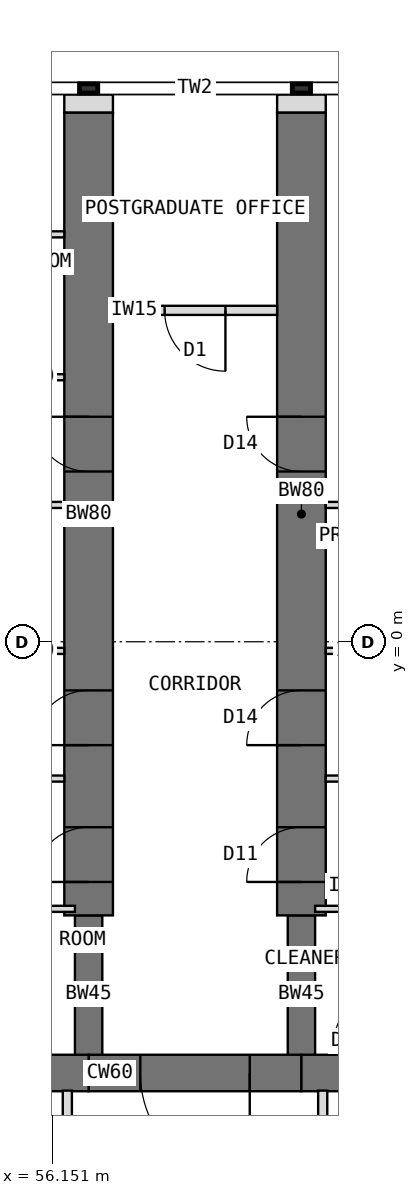
"""IFC4 building model, lengths in metres.
Left out: names, types, materials, properties, quantities, classifications, styles, units other than length and angle.
Written with IfcOpenShell. Run it as: python <this file> out.ifc"""

import sys

from ifc_helpers import new_model, si_unit, direction, frame, frame_2d, origin, place, context, subcontext, project, spatial, rectangle, extrude, element, fill, save


model = new_model("IFC4")
c1 = context("Model", 3, precision=1e-05, world=origin(), true_north=direction((0.0, 1.0)))
c2 = subcontext(c1, "Body", "Model", "MODEL_VIEW")
j1 = project(units=[si_unit("LENGTHUNIT", "METRE"), si_unit("PLANEANGLEUNIT", "RADIAN")], contexts=[c1])
p1 = place(None, origin())
s1 = spatial("IfcSite", under=j1, at=p1, CompositionType="ELEMENT")
p2 = place(p1, origin())
s2 = spatial("IfcBuilding", under=s1, at=p2, CompositionType="ELEMENT")
p3 = place(p2, frame((0.0, 0.0, 161.5)))
s3 = spatial("IfcBuildingStorey", under=s2, at=p3, CompositionType="ELEMENT", Elevation=161.5)
p4 = place(p3, frame((64.798, -7.092, 0.0), z_axis=(0.0, 0.0, 1.0), x_axis=(-1.0, 0.0, 0.0)))
e1 = element("IfcWall", 1, at=p4, inside=s3, PredefinedType="SHEAR", context=c2, shape_type="SweptSolid", body=[
    extrude(rectangle(XDim=4.548, YDim=0.6, at=frame_2d((2.274, 0.0))), origin(), (0.0, 0.0, 1.0), 4.0),
])
p5 = place(p3, frame((60.25, -7.092, 0.0), z_axis=(0.0, 0.0, 1.0), x_axis=(-1.0, 0.0, 0.0)))
e2 = element("IfcWall", 2, at=p5, inside=s3, PredefinedType="SHEAR", context=c2, shape_type="SweptSolid", body=[
    extrude(rectangle(XDim=3.5, YDim=0.6, at=frame_2d((1.75, 0.0))), origin(), (0.0, 0.0, 1.0), 4.0),
])
p6 = place(p5, frame((0.85, 0.0, 0.0)))
e3 = element("IfcOpeningElement", 3, at=p6, cuts=e2, PredefinedType="OPENING", context=c2, shape_type="SweptSolid", body=[
    extrude(rectangle(XDim=1.8, YDim=2.1, at=frame_2d((0.9, 1.05))), frame((0.0, 0.31, 0.0), z_axis=(0.0, -1.0, 0.0), x_axis=(1.0, 0.0, 0.0)), (0.0, 0.0, 1.0), 0.62),
])
p7 = place(p3, frame((56.75, -7.092, 0.0), z_axis=(0.0, 0.0, 1.0), x_axis=(-1.0, 0.0, 0.0)))
e4 = element("IfcWall", 4, at=p7, inside=s3, PredefinedType="SHEAR", context=c2, shape_type="SweptSolid", body=[
    extrude(rectangle(XDim=4.548, YDim=0.6, at=frame_2d((2.274, 0.0))), origin(), (0.0, 0.0, 1.0), 4.0),
])
p8 = place(p3, frame((56.75, -7.092, 0.0), z_axis=(0.0, 0.0, 1.0), x_axis=(0.0, 1.0, 0.0)))
e5 = element("IfcWall", 5, at=p8, inside=s3, PredefinedType="SHEAR", context=c2, shape_type="SweptSolid", body=[
    extrude(rectangle(XDim=2.592, YDim=0.45, at=frame_2d((1.296, 0.0))), origin(), (0.0, 0.0, 1.0), 4.0),
])
p9 = place(p3, frame((56.75, -4.5, 0.0), z_axis=(0.0, 0.0, 1.0), x_axis=(0.0, 1.0, 0.0)))
e6 = element("IfcWall", 6, at=p9, inside=s3, PredefinedType="SHEAR", context=c2, shape_type="SweptSolid", body=[
    extrude(rectangle(XDim=13.2, YDim=0.8, at=frame_2d((6.6, 0.0))), origin(), (0.0, 0.0, 1.0), 4.0),
])
p10 = place(p9, frame((0.55, 0.0, 0.0)))
e7 = element("IfcOpeningElement", 7, at=p10, cuts=e6, PredefinedType="OPENING", context=c2, shape_type="SweptSolid", body=[
    extrude(rectangle(XDim=0.9, YDim=2.1, at=frame_2d((0.45, 1.05))), frame((0.0, 0.41, 0.0), z_axis=(0.0, -1.0, 0.0), x_axis=(1.0, 0.0, 0.0)), (0.0, 0.0, 1.0), 0.82),
])
p11 = place(p9, frame((2.8, 0.0, 0.0)))
e8 = element("IfcOpeningElement", 8, at=p11, cuts=e6, PredefinedType="OPENING", context=c2, shape_type="SweptSolid", body=[
    extrude(rectangle(XDim=0.9, YDim=2.1, at=frame_2d((0.45, 1.05))), frame((0.0, 0.41, 0.0), z_axis=(0.0, -1.0, 0.0), x_axis=(1.0, 0.0, 0.0)), (0.0, 0.0, 1.0), 0.82),
])
p12 = place(p9, frame((7.3, 0.0, 0.0)))
e9 = element("IfcOpeningElement", 9, at=p12, cuts=e6, PredefinedType="OPENING", context=c2, shape_type="SweptSolid", body=[
    extrude(rectangle(XDim=0.9, YDim=2.1, at=frame_2d((0.45, 1.05))), frame((0.0, 0.41, 0.0), z_axis=(0.0, -1.0, 0.0), x_axis=(1.0, 0.0, 0.0)), (0.0, 0.0, 1.0), 0.82),
])
p13 = place(p3, frame((60.25, -7.092, 0.0), z_axis=(0.0, 0.0, 1.0), x_axis=(0.0, 1.0, 0.0)))
e10 = element("IfcWall", 10, at=p13, inside=s3, PredefinedType="SHEAR", context=c2, shape_type="SweptSolid", body=[
    extrude(rectangle(XDim=2.592, YDim=0.45, at=frame_2d((1.296, 0.0))), origin(), (0.0, 0.0, 1.0), 4.0),
])
p14 = place(p3, frame((60.25, -4.5, 0.0), z_axis=(0.0, 0.0, 1.0), x_axis=(0.0, 1.0, 0.0)))
e11 = element("IfcWall", 11, at=p14, inside=s3, PredefinedType="SHEAR", context=c2, shape_type="SweptSolid", body=[
    extrude(rectangle(XDim=13.2, YDim=0.8, at=frame_2d((6.6, 0.0))), origin(), (0.0, 0.0, 1.0), 4.0),
])
p15 = place(p14, frame((0.55, 0.0, 0.0)))
e12 = element("IfcOpeningElement", 12, at=p15, cuts=e11, PredefinedType="OPENING", context=c2, shape_type="SweptSolid", body=[
    extrude(rectangle(XDim=0.9, YDim=2.1, at=frame_2d((0.45, 1.05))), frame((0.0, 0.41, 0.0), z_axis=(0.0, -1.0, 0.0), x_axis=(1.0, 0.0, 0.0)), (0.0, 0.0, 1.0), 0.82),
])
p16 = place(p14, frame((2.8, 0.0, 0.0)))
e13 = element("IfcOpeningElement", 13, at=p16, cuts=e11, PredefinedType="OPENING", context=c2, shape_type="SweptSolid", body=[
    extrude(rectangle(XDim=0.9, YDim=2.1, at=frame_2d((0.45, 1.05))), frame((0.0, 0.41, 0.0), z_axis=(0.0, -1.0, 0.0), x_axis=(1.0, 0.0, 0.0)), (0.0, 0.0, 1.0), 0.82),
])
p17 = place(p14, frame((7.3, 0.0, 0.0)))
e14 = element("IfcOpeningElement", 14, at=p17, cuts=e11, PredefinedType="OPENING", context=c2, shape_type="SweptSolid", body=[
    extrude(rectangle(XDim=0.9, YDim=2.1, at=frame_2d((0.45, 1.05))), frame((0.0, 0.41, 0.0), z_axis=(0.0, -1.0, 0.0), x_axis=(1.0, 0.0, 0.0)), (0.0, 0.0, 1.0), 0.82),
])
for number, where, z_axis, x_axis in (
    (15, (56.75, 8.7, 0.0), (0.0, 0.0, 1.0), (0.0, 1.0, 0.0)),
    (16, (60.25, 8.7, 0.0), (0.0, 0.0, 1.0), (0.0, 1.0, 0.0)),
):
    element("IfcWall", number, at=place(p3, frame(where, z_axis=z_axis, x_axis=x_axis)), inside=s3, PredefinedType="PARTITIONING", context=c2, shape_type="SweptSolid", body=[
        extrude(rectangle(XDim=0.3, YDim=0.8, at=frame_2d((0.15, 0.0))), origin(), (0.0, 0.0, 1.0), 3.7),
    ])
for number, where, z_axis, x_axis in (
    (17, (56.35, -2.25, 0.0), (0.0, 0.0, 1.0), (-1.0, 0.0, 0.0)),
    (18, (56.35, 2.25, 0.0), (0.0, 0.0, 1.0), (-1.0, 0.0, 0.0)),
):
    element("IfcWall", number, at=place(p3, frame(where, z_axis=z_axis, x_axis=x_axis)), inside=s3, PredefinedType="PARTITIONING", context=c2, shape_type="SweptSolid", body=[
        extrude(rectangle(XDim=4.6, YDim=0.1, at=frame_2d((2.3, 0.0))), origin(), (0.0, 0.0, 1.0), 3.7),
    ])
p18 = place(p3, frame((56.35, -0.15, 0.0), z_axis=(0.0, 0.0, 1.0), x_axis=(-1.0, 0.0, 0.0)))
e19 = element("IfcWall", 19, at=p18, inside=s3, PredefinedType="PARTITIONING", context=c2, shape_type="SweptSolid", body=[
    extrude(rectangle(XDim=3.4, YDim=0.1, at=frame_2d((1.7, 0.0))), origin(), (0.0, 0.0, 1.0), 3.7),
])
p19 = place(p18, frame((1.25, 0.0, 0.0)))
e20 = element("IfcOpeningElement", 20, at=p19, cuts=e19, PredefinedType="OPENING", context=c2, shape_type="SweptSolid", body=[
    extrude(rectangle(XDim=0.9, YDim=2.1, at=frame_2d((0.45, 1.05))), frame((0.0, 0.06, 0.0), z_axis=(0.0, -1.0, 0.0), x_axis=(1.0, 0.0, 0.0)), (0.0, 0.0, 1.0), 0.12),
])
p20 = place(p3, frame((56.35, 4.35, 0.0), z_axis=(0.0, 0.0, 1.0), x_axis=(-1.0, 0.0, 0.0)))
e21 = element("IfcWall", 21, at=p20, inside=s3, PredefinedType="PARTITIONING", context=c2, shape_type="SweptSolid", body=[
    extrude(rectangle(XDim=3.4, YDim=0.1, at=frame_2d((1.7, 0.0))), origin(), (0.0, 0.0, 1.0), 3.7),
])
p21 = place(p20, frame((1.25, 0.0, 0.0)))
e22 = element("IfcOpeningElement", 22, at=p21, cuts=e21, PredefinedType="OPENING", context=c2, shape_type="SweptSolid", body=[
    extrude(rectangle(XDim=0.9, YDim=2.1, at=frame_2d((0.45, 1.05))), frame((0.0, 0.06, 0.0), z_axis=(0.0, -1.0, 0.0), x_axis=(1.0, 0.0, 0.0)), (0.0, 0.0, 1.0), 0.12),
])
p22 = place(p3, frame((56.35, 6.7, 0.0), z_axis=(0.0, 0.0, 1.0), x_axis=(-1.0, 0.0, 0.0)))
e23 = element("IfcWall", 23, at=p22, inside=s3, PredefinedType="PARTITIONING", context=c2, shape_type="SweptSolid", body=[
    extrude(rectangle(XDim=3.4, YDim=0.1, at=frame_2d((1.7, 0.0))), origin(), (0.0, 0.0, 1.0), 3.7),
])
p23 = place(p3, frame((56.525, -4.392, 0.0), z_axis=(0.0, 0.0, 1.0), x_axis=(-1.0, 0.0, 0.0)))
e24 = element("IfcWall", 24, at=p23, inside=s3, PredefinedType="PARTITIONING", context=c2, shape_type="SweptSolid", body=[
    extrude(rectangle(XDim=3.2, YDim=0.1, at=frame_2d((1.6, 0.0))), origin(), (0.0, 0.0, 1.0), 3.7),
])
for number, where, z_axis, x_axis in (
    (25, (60.65, -2.25, 0.0), (0.0, 0.0, 1.0), (1.0, 0.0, 0.0)),
    (26, (60.65, 2.25, 0.0), (0.0, 0.0, 1.0), (1.0, 0.0, 0.0)),
):
    element("IfcWall", number, at=place(p3, frame(where, z_axis=z_axis, x_axis=x_axis)), inside=s3, PredefinedType="PARTITIONING", context=c2, shape_type="SweptSolid", body=[
        extrude(rectangle(XDim=4.6, YDim=0.1, at=frame_2d((2.3, 0.0))), origin(), (0.0, 0.0, 1.0), 3.7),
    ])
p24 = place(p3, frame((60.65, -0.15, 0.0), z_axis=(0.0, 0.0, 1.0), x_axis=(1.0, 0.0, 0.0)))
e27 = element("IfcWall", 27, at=p24, inside=s3, PredefinedType="PARTITIONING", context=c2, shape_type="SweptSolid", body=[
    extrude(rectangle(XDim=3.4, YDim=0.1, at=frame_2d((1.7, 0.0))), origin(), (0.0, 0.0, 1.0), 3.7),
])
p25 = place(p24, frame((1.25, 0.0, 0.0)))
e28 = element("IfcOpeningElement", 28, at=p25, cuts=e27, PredefinedType="OPENING", context=c2, shape_type="SweptSolid", body=[
    extrude(rectangle(XDim=0.9, YDim=2.1, at=frame_2d((0.45, 1.05))), frame((0.0, 0.06, 0.0), z_axis=(0.0, -1.0, 0.0), x_axis=(1.0, 0.0, 0.0)), (0.0, 0.0, 1.0), 0.12),
])
p26 = place(p3, frame((60.475, -4.392, 0.0), z_axis=(0.0, 0.0, 1.0), x_axis=(1.0, 0.0, 0.0)))
e29 = element("IfcWall", 29, at=p26, inside=s3, PredefinedType="PARTITIONING", context=c2, shape_type="SweptSolid", body=[
    extrude(rectangle(XDim=1.2, YDim=0.1, at=frame_2d((0.6, 0.0))), origin(), (0.0, 0.0, 1.0), 3.7),
])
p27 = place(p3, frame((56.4, -11.857, 0.0), z_axis=(0.0, 0.0, 1.0), x_axis=(0.0, 1.0, 0.0)))
e30 = element("IfcWall", 30, at=p27, inside=s3, PredefinedType="PARTITIONING", context=c2, shape_type="SweptSolid", body=[
    extrude(rectangle(XDim=4.476, YDim=0.15, at=frame_2d((2.238, 0.0))), origin(), (0.0, 0.0, 1.0), 3.7),
])
p28 = place(p27, frame((0.843, 0.0, 0.0)))
e31 = element("IfcOpeningElement", 31, at=p28, cuts=e30, PredefinedType="OPENING", context=c2, shape_type="SweptSolid", body=[
    extrude(rectangle(XDim=1.0, YDim=2.1, at=frame_2d((0.5, 1.05))), frame((0.0, 0.085, 0.0), z_axis=(0.0, -1.0, 0.0), x_axis=(1.0, 0.0, 0.0)), (0.0, 0.0, 1.0), 0.17),
])
p29 = place(p3, frame((60.6, -7.382, 0.0), z_axis=(0.0, 0.0, 1.0), x_axis=(0.0, -1.0, 0.0)))
e32 = element("IfcWall", 32, at=p29, inside=s3, PredefinedType="PARTITIONING", context=c2, shape_type="SweptSolid", body=[
    extrude(rectangle(XDim=4.476, YDim=0.15, at=frame_2d((2.238, 0.0))), origin(), (0.0, 0.0, 1.0), 3.7),
])
p30 = place(p29, frame((2.633, 0.0, 0.0)))
e33 = element("IfcOpeningElement", 33, at=p30, cuts=e32, PredefinedType="OPENING", context=c2, shape_type="SweptSolid", body=[
    extrude(rectangle(XDim=1.0, YDim=2.1, at=frame_2d((0.5, 1.05))), frame((0.0, 0.085, 0.0), z_axis=(0.0, -1.0, 0.0), x_axis=(1.0, 0.0, 0.0)), (0.0, 0.0, 1.0), 0.17),
])
p31 = place(p3, frame((59.85, 5.45, 0.0), z_axis=(0.0, 0.0, 1.0), x_axis=(-1.0, 0.0, 0.0)))
e34 = element("IfcWall", 34, at=p31, inside=s3, PredefinedType="PARTITIONING", context=c2, shape_type="SweptSolid", body=[
    extrude(rectangle(XDim=2.7, YDim=0.15, at=frame_2d((1.35, 0.0))), origin(), (0.0, 0.0, 1.0), 3.7),
])
p32 = place(p31, frame((0.85, 0.0, 0.0)))
e35 = element("IfcOpeningElement", 35, at=p32, cuts=e34, PredefinedType="OPENING", context=c2, shape_type="SweptSolid", body=[
    extrude(rectangle(XDim=1.0, YDim=2.1, at=frame_2d((0.5, 1.05))), frame((0.0, 0.085, 0.0), z_axis=(0.0, -1.0, 0.0), x_axis=(1.0, 0.0, 0.0)), (0.0, 0.0, 1.0), 0.17),
])
p33 = place(p6, origin())
e36 = element("IfcDoor", 36, at=p33, inside=s3, OperationType="DOUBLE_DOOR_DOUBLE_SWING", PredefinedType="DOOR", context=c2, shape_type="SweptSolid", body=[
    extrude(rectangle(XDim=1.72, YDim=2.06, at=frame_2d((0.9, 1.03))), frame((0.0, 0.025, 0.0), z_axis=(0.0, -1.0, 0.0), x_axis=(1.0, 0.0, 0.0)), (0.0, 0.0, 1.0), 0.05),
    extrude(rectangle(XDim=0.04, YDim=2.1, at=frame_2d((0.02, 1.05))), frame((0.0, 0.3, 0.0), z_axis=(0.0, -1.0, 0.0), x_axis=(1.0, 0.0, 0.0)), (0.0, 0.0, 1.0), 0.6),
    extrude(rectangle(XDim=0.04, YDim=2.1, at=frame_2d((1.78, 1.05))), frame((0.0, 0.3, 0.0), z_axis=(0.0, -1.0, 0.0), x_axis=(1.0, 0.0, 0.0)), (0.0, 0.0, 1.0), 0.6),
    extrude(rectangle(XDim=1.72, YDim=0.04, at=frame_2d((0.9, 2.08))), frame((0.0, 0.3, 0.0), z_axis=(0.0, -1.0, 0.0), x_axis=(1.0, 0.0, 0.0)), (0.0, 0.0, 1.0), 0.6),
])
fill(e3, e36)
p34 = place(p32, origin())
e37 = element("IfcDoor", 37, at=p34, inside=s3, OperationType="SINGLE_SWING_LEFT", PredefinedType="DOOR", context=c2, shape_type="SweptSolid", body=[
    extrude(rectangle(XDim=1.0, YDim=2.1, at=frame_2d((0.5, 1.05))), frame((0.0, 0.025, 0.0), z_axis=(0.0, -1.0, 0.0), x_axis=(1.0, 0.0, 0.0)), (0.0, 0.0, 1.0), 0.05),
])
fill(e35, e37)
p35 = place(p10, origin())
e38 = element("IfcDoor", 38, at=p35, inside=s3, OperationType="SINGLE_SWING_LEFT", PredefinedType="DOOR", context=c2, shape_type="SweptSolid", body=[
    extrude(rectangle(XDim=0.82, YDim=2.06, at=frame_2d((0.45, 1.03))), frame((0.0, 0.025, 0.0), z_axis=(0.0, -1.0, 0.0), x_axis=(1.0, 0.0, 0.0)), (0.0, 0.0, 1.0), 0.05),
    extrude(rectangle(XDim=0.04, YDim=2.1, at=frame_2d((0.02, 1.05))), frame((0.0, 0.4, 0.0), z_axis=(0.0, -1.0, 0.0), x_axis=(1.0, 0.0, 0.0)), (0.0, 0.0, 1.0), 0.8),
    extrude(rectangle(XDim=0.04, YDim=2.1, at=frame_2d((0.88, 1.05))), frame((0.0, 0.4, 0.0), z_axis=(0.0, -1.0, 0.0), x_axis=(1.0, 0.0, 0.0)), (0.0, 0.0, 1.0), 0.8),
    extrude(rectangle(XDim=0.82, YDim=0.04, at=frame_2d((0.45, 2.08))), frame((0.0, 0.4, 0.0), z_axis=(0.0, -1.0, 0.0), x_axis=(1.0, 0.0, 0.0)), (0.0, 0.0, 1.0), 0.8),
])
fill(e7, e38)
p36 = place(p11, origin())
e39 = element("IfcDoor", 39, at=p36, inside=s3, OperationType="SINGLE_SWING_LEFT", PredefinedType="DOOR", context=c2, shape_type="SweptSolid", body=[
    extrude(rectangle(XDim=0.82, YDim=2.06, at=frame_2d((0.45, 1.03))), frame((0.0, 0.025, 0.0), z_axis=(0.0, -1.0, 0.0), x_axis=(1.0, 0.0, 0.0)), (0.0, 0.0, 1.0), 0.05),
    extrude(rectangle(XDim=0.04, YDim=2.1, at=frame_2d((0.02, 1.05))), frame((0.0, 0.4, 0.0), z_axis=(0.0, -1.0, 0.0), x_axis=(1.0, 0.0, 0.0)), (0.0, 0.0, 1.0), 0.8),
    extrude(rectangle(XDim=0.04, YDim=2.1, at=frame_2d((0.88, 1.05))), frame((0.0, 0.4, 0.0), z_axis=(0.0, -1.0, 0.0), x_axis=(1.0, 0.0, 0.0)), (0.0, 0.0, 1.0), 0.8),
    extrude(rectangle(XDim=0.82, YDim=0.04, at=frame_2d((0.45, 2.08))), frame((0.0, 0.4, 0.0), z_axis=(0.0, -1.0, 0.0), x_axis=(1.0, 0.0, 0.0)), (0.0, 0.0, 1.0), 0.8),
])
fill(e8, e39)
p37 = place(p12, origin())
e40 = element("IfcDoor", 40, at=p37, inside=s3, OperationType="SINGLE_SWING_RIGHT", PredefinedType="DOOR", context=c2, shape_type="SweptSolid", body=[
    extrude(rectangle(XDim=0.82, YDim=2.06, at=frame_2d((0.45, 1.03))), frame((0.0, 0.025, 0.0), z_axis=(0.0, -1.0, 0.0), x_axis=(1.0, 0.0, 0.0)), (0.0, 0.0, 1.0), 0.05),
    extrude(rectangle(XDim=0.04, YDim=2.1, at=frame_2d((0.02, 1.05))), frame((0.0, 0.4, 0.0), z_axis=(0.0, -1.0, 0.0), x_axis=(1.0, 0.0, 0.0)), (0.0, 0.0, 1.0), 0.8),
    extrude(rectangle(XDim=0.04, YDim=2.1, at=frame_2d((0.88, 1.05))), frame((0.0, 0.4, 0.0), z_axis=(0.0, -1.0, 0.0), x_axis=(1.0, 0.0, 0.0)), (0.0, 0.0, 1.0), 0.8),
    extrude(rectangle(XDim=0.82, YDim=0.04, at=frame_2d((0.45, 2.08))), frame((0.0, 0.4, 0.0), z_axis=(0.0, -1.0, 0.0), x_axis=(1.0, 0.0, 0.0)), (0.0, 0.0, 1.0), 0.8),
])
fill(e9, e40)
p38 = place(p15, origin())
e41 = element("IfcDoor", 41, at=p38, inside=s3, OperationType="SINGLE_SWING_LEFT", PredefinedType="DOOR", context=c2, shape_type="SweptSolid", body=[
    extrude(rectangle(XDim=0.82, YDim=2.06, at=frame_2d((0.45, 1.03))), frame((0.0, 0.025, 0.0), z_axis=(0.0, -1.0, 0.0), x_axis=(1.0, 0.0, 0.0)), (0.0, 0.0, 1.0), 0.05),
    extrude(rectangle(XDim=0.04, YDim=2.1, at=frame_2d((0.02, 1.05))), frame((0.0, 0.4, 0.0), z_axis=(0.0, -1.0, 0.0), x_axis=(1.0, 0.0, 0.0)), (0.0, 0.0, 1.0), 0.8),
    extrude(rectangle(XDim=0.04, YDim=2.1, at=frame_2d((0.88, 1.05))), frame((0.0, 0.4, 0.0), z_axis=(0.0, -1.0, 0.0), x_axis=(1.0, 0.0, 0.0)), (0.0, 0.0, 1.0), 0.8),
    extrude(rectangle(XDim=0.82, YDim=0.04, at=frame_2d((0.45, 2.08))), frame((0.0, 0.4, 0.0), z_axis=(0.0, -1.0, 0.0), x_axis=(1.0, 0.0, 0.0)), (0.0, 0.0, 1.0), 0.8),
])
fill(e12, e41)
p39 = place(p16, origin())
e42 = element("IfcDoor", 42, at=p39, inside=s3, OperationType="SINGLE_SWING_LEFT", PredefinedType="DOOR", context=c2, shape_type="SweptSolid", body=[
    extrude(rectangle(XDim=0.82, YDim=2.06, at=frame_2d((0.45, 1.03))), frame((0.0, 0.025, 0.0), z_axis=(0.0, -1.0, 0.0), x_axis=(1.0, 0.0, 0.0)), (0.0, 0.0, 1.0), 0.05),
    extrude(rectangle(XDim=0.04, YDim=2.1, at=frame_2d((0.02, 1.05))), frame((0.0, 0.4, 0.0), z_axis=(0.0, -1.0, 0.0), x_axis=(1.0, 0.0, 0.0)), (0.0, 0.0, 1.0), 0.8),
    extrude(rectangle(XDim=0.04, YDim=2.1, at=frame_2d((0.88, 1.05))), frame((0.0, 0.4, 0.0), z_axis=(0.0, -1.0, 0.0), x_axis=(1.0, 0.0, 0.0)), (0.0, 0.0, 1.0), 0.8),
    extrude(rectangle(XDim=0.82, YDim=0.04, at=frame_2d((0.45, 2.08))), frame((0.0, 0.4, 0.0), z_axis=(0.0, -1.0, 0.0), x_axis=(1.0, 0.0, 0.0)), (0.0, 0.0, 1.0), 0.8),
])
fill(e13, e42)
p40 = place(p17, origin())
e43 = element("IfcDoor", 43, at=p40, inside=s3, OperationType="SINGLE_SWING_RIGHT", PredefinedType="DOOR", context=c2, shape_type="SweptSolid", body=[
    extrude(rectangle(XDim=0.82, YDim=2.06, at=frame_2d((0.45, 1.03))), frame((0.0, 0.025, 0.0), z_axis=(0.0, -1.0, 0.0), x_axis=(1.0, 0.0, 0.0)), (0.0, 0.0, 1.0), 0.05),
    extrude(rectangle(XDim=0.04, YDim=2.1, at=frame_2d((0.02, 1.05))), frame((0.0, 0.4, 0.0), z_axis=(0.0, -1.0, 0.0), x_axis=(1.0, 0.0, 0.0)), (0.0, 0.0, 1.0), 0.8),
    extrude(rectangle(XDim=0.04, YDim=2.1, at=frame_2d((0.88, 1.05))), frame((0.0, 0.4, 0.0), z_axis=(0.0, -1.0, 0.0), x_axis=(1.0, 0.0, 0.0)), (0.0, 0.0, 1.0), 0.8),
    extrude(rectangle(XDim=0.82, YDim=0.04, at=frame_2d((0.45, 2.08))), frame((0.0, 0.4, 0.0), z_axis=(0.0, -1.0, 0.0), x_axis=(1.0, 0.0, 0.0)), (0.0, 0.0, 1.0), 0.8),
])
fill(e14, e43)
save(model, sys.argv[1])
